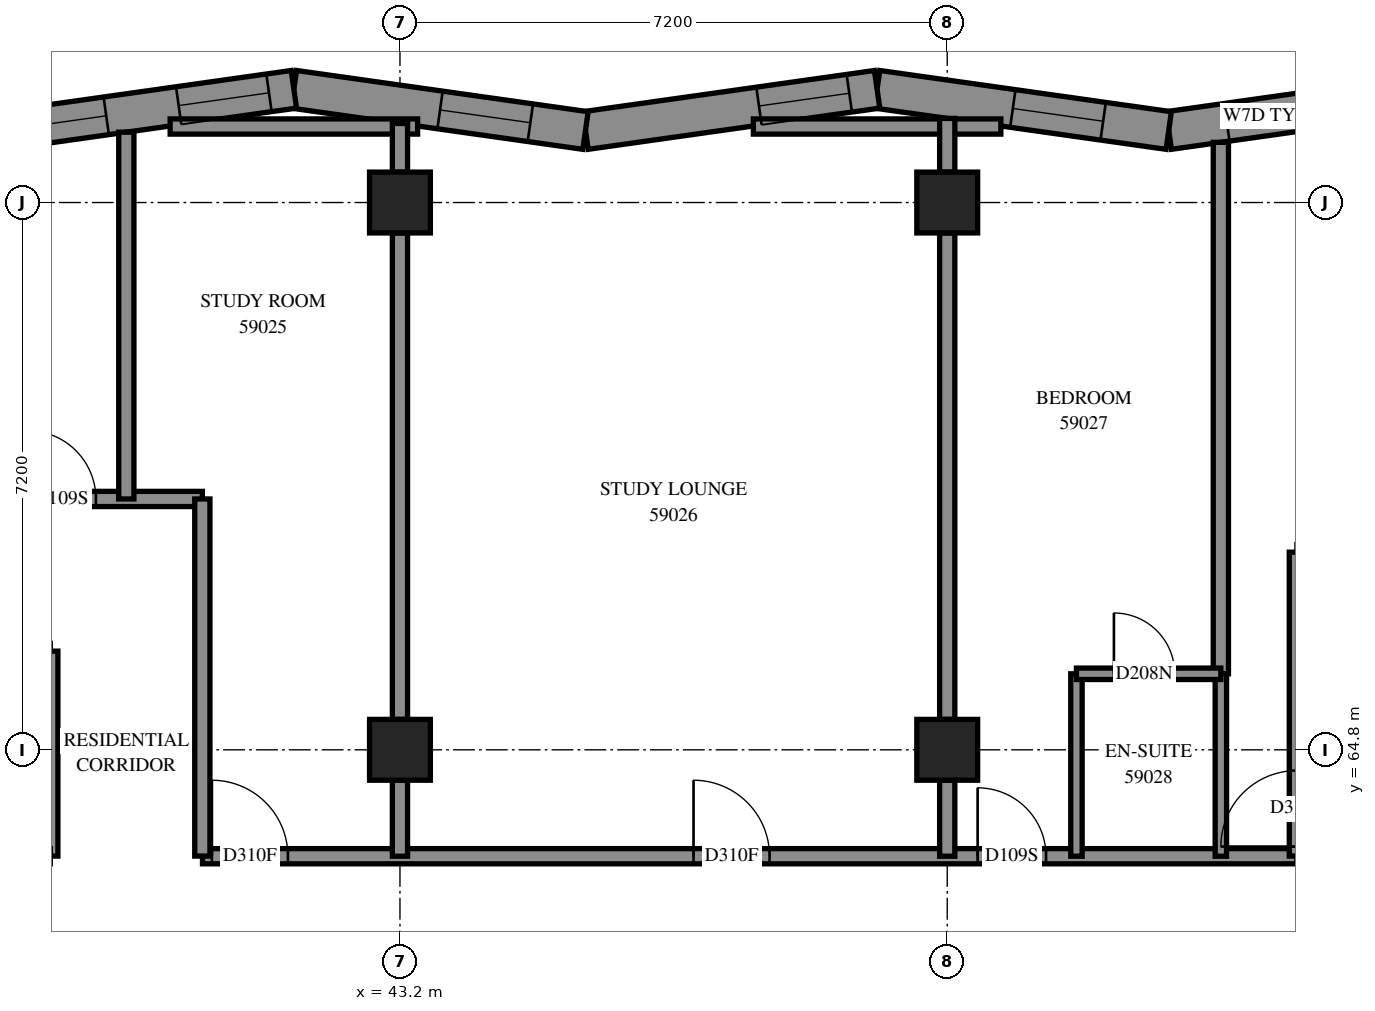
"""IFC4 building model, lengths in metres.
Left out: names, types, materials, properties, quantities, classifications, styles, units other than length and angle.
Written with IfcOpenShell. Run it as: python <this file> out.ifc"""

import sys

from ifc_helpers import new_model, si_unit, direction, frame, frame_2d, origin, origin_2d, place, context, subcontext, project, spatial, polyline, rectangle, outline, extrude, element, fill, save


model = new_model("IFC4")
c1 = context("Model", 3, precision=1e-05, world=origin(), true_north=direction((0.0, 1.0)))
c2 = subcontext(c1, "Body", "Model", "MODEL_VIEW")
j1 = project(units=[si_unit("LENGTHUNIT", "METRE"), si_unit("PLANEANGLEUNIT", "RADIAN")], contexts=[c1])
p1 = place(None, origin())
s1 = spatial("IfcSite", under=j1, at=p1, CompositionType="ELEMENT")
p2 = place(p1, origin())
s2 = spatial("IfcBuilding", under=s1, at=p2, CompositionType="ELEMENT")
p3 = place(p2, frame((0.0, 0.0, 216.8)))
s3 = spatial("IfcBuildingStorey", under=s2, at=p3, CompositionType="ELEMENT", Elevation=216.8)
for number, where, z_axis, x_axis in (
    (1, (43.2, 64.8, 0.0), (0.0, 0.0, 1.0), (1.0, 0.0, 0.0)),
    (2, (43.2, 72.0, 0.0), (0.0, 0.0, 1.0), (1.0, 0.0, 0.0)),
    (3, (50.4, 64.8, 0.0), (0.0, 0.0, 1.0), (1.0, 0.0, 0.0)),
    (4, (50.4, 72.0, 0.0), (0.0, 0.0, 1.0), (1.0, 0.0, 0.0)),
):
    element("IfcColumn", number, at=place(p3, frame(where, z_axis=z_axis, x_axis=x_axis)), inside=s3, PredefinedType="COLUMN", context=c2, shape_type="SweptSolid", body=[
        extrude(rectangle(XDim=0.8, YDim=0.8, at=origin_2d()), origin(), (0.0, 0.0, 1.0), 3.1),
    ])
p4 = place(p3, frame((57.151, 73.49, 0.0), z_axis=(0.0, 0.0, 1.0), x_axis=(-0.9901676803, -0.1398855422, 0.0)))
e5 = element("IfcWall", 5, at=p4, inside=s3, PredefinedType="SOLIDWALL", context=c2, shape_type="SweptSolid", body=[
    extrude(outline(polyline([(-0.035, -0.25), (3.839, -0.25), (3.91, 0.25), (0.035, 0.25), (-0.035, -0.25)])), origin(), (0.0, 0.0, 1.0), 3.1),
])
p5 = place(p4, frame((0.465, 0.0, 0.45)))
e6 = element("IfcOpeningElement", 6, at=p5, cuts=e5, PredefinedType="OPENING", context=c2, shape_type="SweptSolid", body=[
    extrude(rectangle(XDim=0.8, YDim=2.5, at=frame_2d((0.4, 1.25))), frame((0.0, 0.26, 0.0), z_axis=(0.0, -1.0, 0.0), x_axis=(1.0, 0.0, 0.0)), (0.0, 0.0, 1.0), 0.52),
])
p6 = place(p4, frame((1.902, 0.0, 0.5)))
e7 = element("IfcOpeningElement", 7, at=p6, cuts=e5, PredefinedType="OPENING", context=c2, shape_type="SweptSolid", body=[
    extrude(rectangle(XDim=1.2, YDim=2.45, at=frame_2d((0.6, 1.225))), frame((0.0, 0.26, 0.0), z_axis=(0.0, -1.0, 0.0), x_axis=(1.0, 0.0, 0.0)), (0.0, 0.0, 1.0), 0.52),
])
p7 = place(p3, frame((53.314, 72.948, 0.0), z_axis=(0.0, 0.0, 1.0), x_axis=(-0.9901681853, 0.1398819675, 0.0)))
e8 = element("IfcWall", 8, at=p7, inside=s3, PredefinedType="SOLIDWALL", context=c2, shape_type="SweptSolid", body=[
    extrude(outline(polyline([(0.035, -0.25), (3.91, -0.25), (3.839, 0.25), (-0.035, 0.25), (0.035, -0.25)])), origin(), (0.0, 0.0, 1.0), 3.1),
])
p8 = place(p7, frame((0.872, 0.0, 0.45)))
e9 = element("IfcOpeningElement", 9, at=p8, cuts=e8, PredefinedType="OPENING", context=c2, shape_type="SweptSolid", body=[
    extrude(rectangle(XDim=1.2, YDim=2.5, at=frame_2d((0.6, 1.25))), frame((0.0, 0.26, 0.0), z_axis=(0.0, -1.0, 0.0), x_axis=(1.0, 0.0, 0.0)), (0.0, 0.0, 1.0), 0.52),
])
p9 = place(p3, frame((49.477, 73.49, 0.0), z_axis=(0.0, 0.0, 1.0), x_axis=(-0.9901681853, -0.1398819675, 0.0)))
e10 = element("IfcWall", 10, at=p9, inside=s3, PredefinedType="SOLIDWALL", context=c2, shape_type="SweptSolid", body=[
    extrude(outline(polyline([(-0.035, -0.25), (3.839, -0.25), (3.91, 0.25), (0.035, 0.25), (-0.035, -0.25)])), origin(), (0.0, 0.0, 1.0), 3.1),
])
p10 = place(p9, frame((0.37, 0.0, 0.45)))
e11 = element("IfcOpeningElement", 11, at=p10, cuts=e10, PredefinedType="OPENING", context=c2, shape_type="SweptSolid", body=[
    extrude(rectangle(XDim=1.2, YDim=2.5, at=frame_2d((0.6, 1.25))), frame((0.0, 0.26, 0.0), z_axis=(0.0, -1.0, 0.0), x_axis=(1.0, 0.0, 0.0)), (0.0, 0.0, 1.0), 0.52),
])
p11 = place(p3, frame((45.641, 72.948, 0.0), z_axis=(0.0, 0.0, 1.0), x_axis=(-0.9901681853, 0.1398819675, 0.0)))
e12 = element("IfcWall", 12, at=p11, inside=s3, PredefinedType="SOLIDWALL", context=c2, shape_type="SweptSolid", body=[
    extrude(outline(polyline([(0.035, -0.25), (3.91, -0.25), (3.839, 0.25), (-0.035, 0.25), (0.035, -0.25)])), origin(), (0.0, 0.0, 1.0), 3.1),
])
p12 = place(p11, frame((0.733, 0.0, 0.45)))
e13 = element("IfcOpeningElement", 13, at=p12, cuts=e12, PredefinedType="OPENING", context=c2, shape_type="SweptSolid", body=[
    extrude(rectangle(XDim=1.2, YDim=2.5, at=frame_2d((0.6, 1.25))), frame((0.0, 0.26, 0.0), z_axis=(0.0, -1.0, 0.0), x_axis=(1.0, 0.0, 0.0)), (0.0, 0.0, 1.0), 0.52),
])
p13 = place(p3, frame((41.804, 73.49, 0.0), z_axis=(0.0, 0.0, 1.0), x_axis=(-0.9901681853, -0.1398819675, 0.0)))
e14 = element("IfcWall", 14, at=p13, inside=s3, PredefinedType="SOLIDWALL", context=c2, shape_type="SweptSolid", body=[
    extrude(outline(polyline([(-0.035, -0.25), (3.839, -0.25), (3.91, 0.25), (0.035, 0.25), (-0.035, -0.25)])), origin(), (0.0, 0.0, 1.0), 3.1),
])
p14 = place(p13, frame((0.331, 0.0, 0.45)))
e15 = element("IfcOpeningElement", 15, at=p14, cuts=e14, PredefinedType="OPENING", context=c2, shape_type="SweptSolid", body=[
    extrude(rectangle(XDim=1.2, YDim=2.5, at=frame_2d((0.6, 1.25))), frame((0.0, 0.26, 0.0), z_axis=(0.0, -1.0, 0.0), x_axis=(1.0, 0.0, 0.0)), (0.0, 0.0, 1.0), 0.52),
])
p15 = place(p13, frame((2.493, 0.0, 0.45)))
e16 = element("IfcOpeningElement", 16, at=p15, cuts=e14, PredefinedType="OPENING", context=c2, shape_type="SweptSolid", body=[
    extrude(rectangle(XDim=1.0, YDim=2.5, at=frame_2d((0.5, 1.25))), frame((0.0, 0.26, 0.0), z_axis=(0.0, -1.0, 0.0), x_axis=(1.0, 0.0, 0.0)), (0.0, 0.0, 1.0), 0.52),
])
p16 = place(p3, frame((40.602, 63.4, 0.0), z_axis=(0.0, 0.0, 1.0), x_axis=(1.0, 0.0, 0.0)))
e17 = element("IfcWall", 17, at=p16, inside=s3, PredefinedType="PARTITIONING", context=c2, shape_type="SweptSolid", body=[
    extrude(rectangle(XDim=14.398, YDim=0.2, at=frame_2d((7.199, 0.0))), origin(), (0.0, 0.0, 1.0), 3.1),
])
p17 = place(p16, frame((0.124, 0.0, 0.0)))
e18 = element("IfcOpeningElement", 18, at=p17, cuts=e17, PredefinedType="OPENING", context=c2, shape_type="SweptSolid", body=[
    extrude(rectangle(XDim=1.0, YDim=2.1, at=frame_2d((0.5, 1.05))), frame((0.0, 0.11, 0.0), z_axis=(0.0, -1.0, 0.0), x_axis=(1.0, 0.0, 0.0)), (0.0, 0.0, 1.0), 0.22),
])
p18 = place(p16, frame((6.46, 0.0, 0.0)))
e19 = element("IfcOpeningElement", 19, at=p18, cuts=e17, PredefinedType="OPENING", context=c2, shape_type="SweptSolid", body=[
    extrude(rectangle(XDim=1.0, YDim=2.1, at=frame_2d((0.5, 1.05))), frame((0.0, 0.11, 0.0), z_axis=(0.0, -1.0, 0.0), x_axis=(1.0, 0.0, 0.0)), (0.0, 0.0, 1.0), 0.22),
])
p19 = place(p16, frame((10.198, 0.0, 0.0)))
e20 = element("IfcOpeningElement", 20, at=p19, cuts=e17, PredefinedType="OPENING", context=c2, shape_type="SweptSolid", body=[
    extrude(rectangle(XDim=0.9, YDim=2.1, at=frame_2d((0.45, 1.05))), frame((0.0, 0.11, 0.0), z_axis=(0.0, -1.0, 0.0), x_axis=(1.0, 0.0, 0.0)), (0.0, 0.0, 1.0), 0.22),
])
p20 = place(p3, frame((28.8, 68.1, 0.0), z_axis=(0.0, 0.0, 1.0), x_axis=(1.0, 0.0, 0.0)))
e21 = element("IfcWall", 21, at=p20, inside=s3, PredefinedType="PARTITIONING", context=c2, shape_type="SweptSolid", body=[
    extrude(rectangle(XDim=11.8, YDim=0.2, at=frame_2d((5.9, 0.0))), origin(), (0.0, 0.0, 1.0), 3.1),
])
p21 = place(p20, frame((2.3, 0.0, 0.0)))
e22 = element("IfcOpeningElement", 22, at=p21, cuts=e21, PredefinedType="OPENING", context=c2, shape_type="SweptSolid", body=[
    extrude(rectangle(XDim=0.9, YDim=2.1, at=frame_2d((0.45, 1.05))), frame((0.0, 0.11, 0.0), z_axis=(0.0, -1.0, 0.0), x_axis=(1.0, 0.0, 0.0)), (0.0, 0.0, 1.0), 0.22),
])
p22 = place(p20, frame((4.0, 0.0, 0.0)))
e23 = element("IfcOpeningElement", 23, at=p22, cuts=e21, PredefinedType="OPENING", context=c2, shape_type="SweptSolid", body=[
    extrude(rectangle(XDim=0.9, YDim=2.1, at=frame_2d((0.45, 1.05))), frame((0.0, 0.11, 0.0), z_axis=(0.0, -1.0, 0.0), x_axis=(1.0, 0.0, 0.0)), (0.0, 0.0, 1.0), 0.22),
])
p23 = place(p20, frame((9.5, 0.0, 0.0)))
e24 = element("IfcOpeningElement", 24, at=p23, cuts=e21, PredefinedType="OPENING", context=c2, shape_type="SweptSolid", body=[
    extrude(rectangle(XDim=0.9, YDim=2.1, at=frame_2d((0.45, 1.05))), frame((0.0, 0.11, 0.0), z_axis=(0.0, -1.0, 0.0), x_axis=(1.0, 0.0, 0.0)), (0.0, 0.0, 1.0), 0.22),
])
p24 = place(p3, frame((54.0, 65.8, 0.0), z_axis=(0.0, 0.0, 1.0), x_axis=(0.0, 1.0, 0.0)))
e25 = element("IfcWall", 25, at=p24, inside=s3, PredefinedType="PARTITIONING", context=c2, shape_type="SweptSolid", body=[
    extrude(rectangle(XDim=6.992, YDim=0.2, at=frame_2d((3.496, 0.0))), origin(), (0.0, 0.0, 1.0), 3.1),
])
for number, where, z_axis, x_axis in (
    (26, (43.2, 65.2, 0.0), (0.0, 0.0, 1.0), (0.0, 1.0, 0.0)),
    (27, (50.4, 65.2, 0.0), (0.0, 0.0, 1.0), (0.0, 1.0, 0.0)),
):
    element("IfcWall", number, at=place(p3, frame(where, z_axis=z_axis, x_axis=x_axis)), inside=s3, PredefinedType="PARTITIONING", context=c2, shape_type="SweptSolid", body=[
        extrude(rectangle(XDim=6.4, YDim=0.2, at=frame_2d((3.2, 0.0))), origin(), (0.0, 0.0, 1.0), 3.1),
    ])
p25 = place(p3, frame((39.6, 68.1, 0.0), z_axis=(0.0, 0.0, 1.0), x_axis=(0.0, 1.0, 0.0)))
e28 = element("IfcWall", 28, at=p25, inside=s3, PredefinedType="PARTITIONING", context=c2, shape_type="SweptSolid", body=[
    extrude(rectangle(XDim=4.826, YDim=0.2, at=frame_2d((2.413, 0.0))), origin(), (0.0, 0.0, 1.0), 3.1),
])
p26 = place(p3, frame((40.6, 63.402, 0.0), z_axis=(0.0, 0.0, 1.0), x_axis=(0.0, 1.0, 0.0)))
e29 = element("IfcWall", 29, at=p26, inside=s3, PredefinedType="PARTITIONING", context=c2, shape_type="SweptSolid", body=[
    extrude(rectangle(XDim=4.698, YDim=0.2, at=frame_2d((2.349, 0.0))), origin(), (0.0, 0.0, 1.0), 3.1),
])
p27 = place(p3, frame((55.0, 63.402, 0.0), z_axis=(0.0, 0.0, 1.0), x_axis=(0.0, 1.0, 0.0)))
e30 = element("IfcWall", 30, at=p27, inside=s3, PredefinedType="PARTITIONING", context=c2, shape_type="SweptSolid", body=[
    extrude(rectangle(XDim=3.998, YDim=0.2, at=frame_2d((1.999, 0.0))), origin(), (0.0, 0.0, 1.0), 3.1),
])
p28 = place(p27, frame((0.125, 0.0, 0.0)))
e31 = element("IfcOpeningElement", 31, at=p28, cuts=e30, PredefinedType="OPENING", context=c2, shape_type="SweptSolid", body=[
    extrude(rectangle(XDim=1.0, YDim=2.1, at=frame_2d((0.5, 1.05))), frame((0.0, 0.11, 0.0), z_axis=(0.0, -1.0, 0.0), x_axis=(1.0, 0.0, 0.0)), (0.0, 0.0, 1.0), 0.22),
])
p29 = place(p3, frame((40.176, 73.0, 0.0), z_axis=(0.0, 0.0, 1.0), x_axis=(1.0, 0.0, 0.0)))
e32 = element("IfcWall", 32, at=p29, inside=s3, PredefinedType="PARTITIONING", context=c2, shape_type="SweptSolid", body=[
    extrude(rectangle(XDim=3.256, YDim=0.2, at=frame_2d((1.628, 0.0))), origin(), (0.0, 0.0, 1.0), 3.1),
])
p30 = place(p3, frame((47.85, 73.0, 0.0), z_axis=(0.0, 0.0, 1.0), x_axis=(1.0, 0.0, 0.0)))
e33 = element("IfcWall", 33, at=p30, inside=s3, PredefinedType="PARTITIONING", context=c2, shape_type="SweptSolid", body=[
    extrude(rectangle(XDim=3.256, YDim=0.2, at=frame_2d((1.628, 0.0))), origin(), (0.0, 0.0, 1.0), 3.1),
])
p31 = place(p3, frame((38.6, 63.402, 0.0), z_axis=(0.0, 0.0, 1.0), x_axis=(0.0, 1.0, 0.0)))
e34 = element("IfcWall", 34, at=p31, inside=s3, PredefinedType="PARTITIONING", context=c2, shape_type="SweptSolid", body=[
    extrude(rectangle(XDim=2.696, YDim=0.2, at=frame_2d((1.348, 0.0))), origin(), (0.0, 0.0, 1.0), 3.1),
])
for number, where, z_axis, x_axis in (
    (35, (52.1, 63.4, 0.0), (0.0, 0.0, 1.0), (0.0, 1.0, 0.0)),
    (36, (54.0, 63.4, 0.0), (0.0, 0.0, 1.0), (0.0, 1.0, 0.0)),
):
    element("IfcWall", number, at=place(p3, frame(where, z_axis=z_axis, x_axis=x_axis)), inside=s3, PredefinedType="PARTITIONING", context=c2, shape_type="SweptSolid", body=[
        extrude(rectangle(XDim=2.4, YDim=0.15, at=frame_2d((1.2, 0.0))), origin(), (0.0, 0.0, 1.0), 3.1),
    ])
p32 = place(p3, frame((52.1, 65.8, 0.0), z_axis=(0.0, 0.0, 1.0), x_axis=(1.0, 0.0, 0.0)))
e37 = element("IfcWall", 37, at=p32, inside=s3, PredefinedType="PARTITIONING", context=c2, shape_type="SweptSolid", body=[
    extrude(rectangle(XDim=1.9, YDim=0.15, at=frame_2d((0.95, 0.0))), origin(), (0.0, 0.0, 1.0), 3.1),
])
p33 = place(p32, frame((0.493, 0.0, 0.0)))
e38 = element("IfcOpeningElement", 38, at=p33, cuts=e37, PredefinedType="OPENING", context=c2, shape_type="SweptSolid", body=[
    extrude(rectangle(XDim=0.8, YDim=2.1, at=frame_2d((0.4, 1.05))), frame((0.0, 0.085, 0.0), z_axis=(0.0, -1.0, 0.0), x_axis=(1.0, 0.0, 0.0)), (0.0, 0.0, 1.0), 0.17),
])
for number, where, z_axis, x_axis in (
    (39, (43.2, 63.4, 0.0), (0.0, 0.0, 1.0), (0.0, 1.0, 0.0)),
    (40, (50.4, 63.4, 0.0), (0.0, 0.0, 1.0), (0.0, 1.0, 0.0)),
):
    element("IfcWall", number, at=place(p3, frame(where, z_axis=z_axis, x_axis=x_axis)), inside=s3, PredefinedType="PARTITIONING", context=c2, shape_type="SweptSolid", body=[
        extrude(rectangle(XDim=1.0, YDim=0.2, at=frame_2d((0.5, 0.0))), origin(), (0.0, 0.0, 1.0), 3.1),
    ])
p34 = place(p3, frame((50.4, 72.4, 0.0), z_axis=(0.0, 0.0, 1.0), x_axis=(0.0, 1.0, 0.0)))
e41 = element("IfcWall", 41, at=p34, inside=s3, PredefinedType="PARTITIONING", context=c2, shape_type="SweptSolid", body=[
    extrude(rectangle(XDim=0.707, YDim=0.2, at=frame_2d((0.353, 0.0))), origin(), (0.0, 0.0, 1.0), 3.1),
])
p35 = place(p3, frame((43.2, 72.4, 0.0), z_axis=(0.0, 0.0, 1.0), x_axis=(0.0, 1.0, 0.0)))
e42 = element("IfcWall", 42, at=p35, inside=s3, PredefinedType="PARTITIONING", context=c2, shape_type="SweptSolid", body=[
    extrude(rectangle(XDim=0.64, YDim=0.2, at=frame_2d((0.32, 0.0))), origin(), (0.0, 0.0, 1.0), 3.1),
])
p36 = place(p8, origin())
e43 = element("IfcWindow", 43, at=p36, inside=s3, PartitioningType="SINGLE_PANEL", PredefinedType="WINDOW", context=c2, shape_type="SweptSolid", body=[
    extrude(rectangle(XDim=1.2, YDim=2.5, at=frame_2d((0.6, 1.25))), frame((0.0, 0.18, 0.0), z_axis=(0.0, -1.0, 0.0), x_axis=(1.0, 0.0, 0.0)), (0.0, 0.0, 1.0), 0.06),
])
fill(e9, e43)
p37 = place(p10, origin())
e44 = element("IfcWindow", 44, at=p37, inside=s3, PartitioningType="SINGLE_PANEL", PredefinedType="WINDOW", context=c2, shape_type="SweptSolid", body=[
    extrude(rectangle(XDim=1.2, YDim=2.5, at=frame_2d((0.6, 1.25))), frame((0.0, 0.14, 0.0), z_axis=(0.0, -1.0, 0.0), x_axis=(1.0, 0.0, 0.0)), (0.0, 0.0, 1.0), 0.06),
])
fill(e11, e44)
p38 = place(p12, origin())
e45 = element("IfcWindow", 45, at=p38, inside=s3, PartitioningType="SINGLE_PANEL", PredefinedType="WINDOW", context=c2, shape_type="SweptSolid", body=[
    extrude(rectangle(XDim=1.2, YDim=2.5, at=frame_2d((0.6, 1.25))), frame((0.0, 0.18, 0.0), z_axis=(0.0, -1.0, 0.0), x_axis=(1.0, 0.0, 0.0)), (0.0, 0.0, 1.0), 0.06),
])
fill(e13, e45)
p39 = place(p14, origin())
e46 = element("IfcWindow", 46, at=p39, inside=s3, PartitioningType="SINGLE_PANEL", PredefinedType="WINDOW", context=c2, shape_type="SweptSolid", body=[
    extrude(rectangle(XDim=1.2, YDim=2.5, at=frame_2d((0.6, 1.25))), frame((0.0, 0.14, 0.0), z_axis=(0.0, -1.0, 0.0), x_axis=(1.0, 0.0, 0.0)), (0.0, 0.0, 1.0), 0.06),
])
fill(e15, e46)
p40 = place(p23, origin())
e47 = element("IfcDoor", 47, at=p40, inside=s3, OperationType="SINGLE_SWING_RIGHT", PredefinedType="DOOR", context=c2, shape_type="SweptSolid", body=[
    extrude(rectangle(XDim=0.9, YDim=2.1, at=frame_2d((0.45, 1.05))), frame((0.0, 0.025, 0.0), z_axis=(0.0, -1.0, 0.0), x_axis=(1.0, 0.0, 0.0)), (0.0, 0.0, 1.0), 0.05),
])
fill(e24, e47)
p41 = place(p17, origin())
e48 = element("IfcDoor", 48, at=p41, inside=s3, OperationType="SINGLE_SWING_LEFT", PredefinedType="DOOR", context=c2, shape_type="SweptSolid", body=[
    extrude(rectangle(XDim=1.0, YDim=2.1, at=frame_2d((0.5, 1.05))), frame((0.0, 0.025, 0.0), z_axis=(0.0, -1.0, 0.0), x_axis=(1.0, 0.0, 0.0)), (0.0, 0.0, 1.0), 0.05),
])
fill(e18, e48)
p42 = place(p18, origin())
e49 = element("IfcDoor", 49, at=p42, inside=s3, OperationType="SINGLE_SWING_RIGHT", PredefinedType="DOOR", context=c2, shape_type="SweptSolid", body=[
    extrude(rectangle(XDim=1.0, YDim=2.1, at=frame_2d((0.5, 1.05))), frame((0.0, 0.025, 0.0), z_axis=(0.0, -1.0, 0.0), x_axis=(1.0, 0.0, 0.0)), (0.0, 0.0, 1.0), 0.05),
])
fill(e19, e49)
p43 = place(p19, origin())
e50 = element("IfcDoor", 50, at=p43, inside=s3, OperationType="SINGLE_SWING_RIGHT", PredefinedType="DOOR", context=c2, shape_type="SweptSolid", body=[
    extrude(rectangle(XDim=0.9, YDim=2.1, at=frame_2d((0.45, 1.05))), frame((0.0, 0.025, 0.0), z_axis=(0.0, -1.0, 0.0), x_axis=(1.0, 0.0, 0.0)), (0.0, 0.0, 1.0), 0.05),
])
fill(e20, e50)
p44 = place(p33, origin())
e51 = element("IfcDoor", 51, at=p44, inside=s3, OperationType="SINGLE_SWING_RIGHT", PredefinedType="DOOR", context=c2, shape_type="SweptSolid", body=[
    extrude(rectangle(XDim=0.8, YDim=2.1, at=frame_2d((0.4, 1.05))), frame((0.0, 0.025, 0.0), z_axis=(0.0, -1.0, 0.0), x_axis=(1.0, 0.0, 0.0)), (0.0, 0.0, 1.0), 0.05),
])
fill(e38, e51)
p45 = place(p28, origin())
e52 = element("IfcDoor", 52, at=p45, inside=s3, OperationType="SINGLE_SWING_LEFT", PredefinedType="DOOR", context=c2, shape_type="SweptSolid", body=[
    extrude(rectangle(XDim=1.0, YDim=2.1, at=frame_2d((0.5, 1.05))), frame((0.0, 0.025, 0.0), z_axis=(0.0, -1.0, 0.0), x_axis=(1.0, 0.0, 0.0)), (0.0, 0.0, 1.0), 0.05),
])
fill(e31, e52)
p46 = place(p6, origin())
e53 = element("IfcWindow", 53, at=p46, inside=s3, PartitioningType="SINGLE_PANEL", PredefinedType="WINDOW", context=c2, shape_type="SweptSolid", body=[
    extrude(rectangle(XDim=1.2, YDim=2.45, at=frame_2d((0.6, 1.225))), frame((0.0, 0.18, 0.0), z_axis=(0.0, -1.0, 0.0), x_axis=(1.0, 0.0, 0.0)), (0.0, 0.0, 1.0), 0.06),
])
fill(e7, e53)
p47 = place(p15, origin())
e54 = element("IfcWindow", 54, at=p47, inside=s3, PartitioningType="SINGLE_PANEL", PredefinedType="WINDOW", context=c2, shape_type="SweptSolid", body=[
    extrude(rectangle(XDim=1.0, YDim=2.5, at=frame_2d((0.5, 1.25))), frame((0.0, 0.18, 0.0), z_axis=(0.0, -1.0, 0.0), x_axis=(1.0, 0.0, 0.0)), (0.0, 0.0, 1.0), 0.06),
])
fill(e16, e54)
save(model, sys.argv[1])
